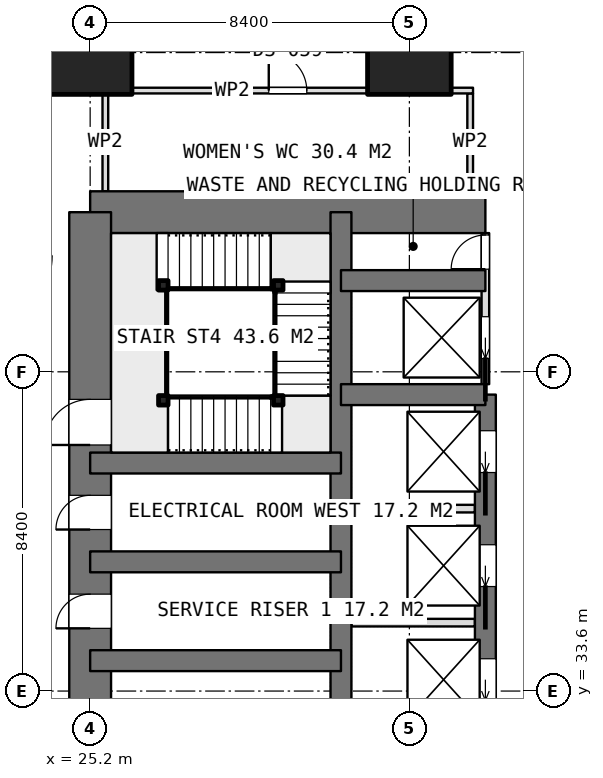
"""IFC4 building model, lengths in metres.
Left out: names, types, materials, properties, quantities, classifications, styles, units other than length and angle.
Written with IfcOpenShell. Run it as: python <this file> out.ifc"""

import sys

from ifc_helpers import new_model, si_unit, direction, frame, frame_2d, origin, origin_2d, place, context, subcontext, project, spatial, rectangle, extrude, element, fill, save


model = new_model("IFC4")
c1 = context("Model", 3, precision=1e-05, world=origin(), true_north=direction((0.0, 1.0)))
c2 = subcontext(c1, "Body", "Model", "MODEL_VIEW")
j1 = project(units=[si_unit("LENGTHUNIT", "METRE"), si_unit("PLANEANGLEUNIT", "RADIAN")], contexts=[c1])
p1 = place(None, origin())
s1 = spatial("IfcSite", under=j1, at=p1, CompositionType="ELEMENT")
p2 = place(p1, origin())
s2 = spatial("IfcBuilding", under=s1, at=p2, CompositionType="ELEMENT")
p3 = place(p2, frame((0.0, 0.0, 51.65)))
s3 = spatial("IfcBuildingStorey", under=s2, at=p3, CompositionType="ELEMENT", Elevation=51.65)
p4 = place(p3, frame((25.2, 46.2, 0.0), z_axis=(0.0, 0.0, 1.0), x_axis=(1.0, 0.0, 0.0)))
e1 = element("IfcWall", 1, at=p4, inside=s3, PredefinedType="SHEAR", context=c2, shape_type="SweptSolid", body=[
    extrude(rectangle(XDim=10.4, YDim=1.1, at=frame_2d((5.2, 0.0))), origin(), (0.0, 0.0, 1.0), 3.75),
])
p5 = place(p3, frame((25.2, 21.0, 0.0), z_axis=(0.0, 0.0, 1.0), x_axis=(0.0, 1.0, 0.0)))
e2 = element("IfcWall", 2, at=p5, inside=s3, PredefinedType="SHEAR", context=c2, shape_type="SweptSolid", body=[
    extrude(rectangle(XDim=25.2, YDim=1.1, at=frame_2d((12.6, 0.0))), origin(), (0.0, 0.0, 1.0), 3.75),
])
p6 = place(p5, frame((7.8, 0.0, 0.0)))
e3 = element("IfcOpeningElement", 3, at=p6, cuts=e2, PredefinedType="OPENING", context=c2, shape_type="SweptSolid", body=[
    extrude(rectangle(XDim=1.2, YDim=2.1, at=frame_2d((0.6, 1.05))), frame((0.0, 0.56, 0.0), z_axis=(0.0, -1.0, 0.0), x_axis=(1.0, 0.0, 0.0)), (0.0, 0.0, 1.0), 1.12),
])
p7 = place(p5, frame((14.25, 0.0, 0.0)))
e4 = element("IfcOpeningElement", 4, at=p7, cuts=e2, PredefinedType="OPENING", context=c2, shape_type="SweptSolid", body=[
    extrude(rectangle(XDim=0.9, YDim=2.1, at=frame_2d((0.45, 1.05))), frame((0.0, 0.56, 0.0), z_axis=(0.0, -1.0, 0.0), x_axis=(1.0, 0.0, 0.0)), (0.0, 0.0, 1.0), 1.12),
])
p8 = place(p5, frame((16.85, 0.0, 0.0)))
e5 = element("IfcOpeningElement", 5, at=p8, cuts=e2, PredefinedType="OPENING", context=c2, shape_type="SweptSolid", body=[
    extrude(rectangle(XDim=0.9, YDim=2.1, at=frame_2d((0.45, 1.05))), frame((0.0, 0.56, 0.0), z_axis=(0.0, -1.0, 0.0), x_axis=(1.0, 0.0, 0.0)), (0.0, 0.0, 1.0), 1.12),
])
p9 = place(p5, frame((19.075, 0.0, 0.0)))
e6 = element("IfcOpeningElement", 6, at=p9, cuts=e2, PredefinedType="OPENING", context=c2, shape_type="SweptSolid", body=[
    extrude(rectangle(XDim=1.2, YDim=2.1, at=frame_2d((0.6, 1.05))), frame((0.0, 0.56, 0.0), z_axis=(0.0, -1.0, 0.0), x_axis=(1.0, 0.0, 0.0)), (0.0, 0.0, 1.0), 1.12),
])
p10 = place(p3, frame((31.8, 21.0, 0.0), z_axis=(0.0, 0.0, 1.0), x_axis=(0.0, 1.0, 0.0)))
e7 = element("IfcWall", 7, at=p10, inside=s3, PredefinedType="SHEAR", context=c2, shape_type="SweptSolid", body=[
    extrude(rectangle(XDim=25.2, YDim=0.55, at=frame_2d((12.6, 0.0))), origin(), (0.0, 0.0, 1.0), 3.75),
])
p11 = place(p3, frame((35.6, 23.4, 0.0), z_axis=(0.0, 0.0, 1.0), x_axis=(0.0, 1.0, 0.0)))
e8 = element("IfcWall", 8, at=p11, inside=s3, PredefinedType="SHEAR", context=c2, shape_type="SweptSolid", body=[
    extrude(rectangle(XDim=18.0, YDim=0.55, at=frame_2d((9.0, 0.0))), origin(), (0.0, 0.0, 1.0), 3.75),
])
p12 = place(p11, frame((0.95, 0.0, 0.0)))
e9 = element("IfcOpeningElement", 9, at=p12, cuts=e8, PredefinedType="OPENING", context=c2, shape_type="SweptSolid", body=[
    extrude(rectangle(XDim=1.1, YDim=2.1, at=frame_2d((0.55, 1.05))), frame((0.0, 0.285, 0.0), z_axis=(0.0, -1.0, 0.0), x_axis=(1.0, 0.0, 0.0)), (0.0, 0.0, 1.0), 0.57),
])
p13 = place(p11, frame((3.95, 0.0, 0.0)))
e10 = element("IfcOpeningElement", 10, at=p13, cuts=e8, PredefinedType="OPENING", context=c2, shape_type="SweptSolid", body=[
    extrude(rectangle(XDim=1.1, YDim=2.1, at=frame_2d((0.55, 1.05))), frame((0.0, 0.285, 0.0), z_axis=(0.0, -1.0, 0.0), x_axis=(1.0, 0.0, 0.0)), (0.0, 0.0, 1.0), 0.57),
])
p14 = place(p11, frame((6.95, 0.0, 0.0)))
e11 = element("IfcOpeningElement", 11, at=p14, cuts=e8, PredefinedType="OPENING", context=c2, shape_type="SweptSolid", body=[
    extrude(rectangle(XDim=1.1, YDim=2.1, at=frame_2d((0.55, 1.05))), frame((0.0, 0.285, 0.0), z_axis=(0.0, -1.0, 0.0), x_axis=(1.0, 0.0, 0.0)), (0.0, 0.0, 1.0), 0.57),
])
p15 = place(p11, frame((9.95, 0.0, 0.0)))
e12 = element("IfcOpeningElement", 12, at=p15, cuts=e8, PredefinedType="OPENING", context=c2, shape_type="SweptSolid", body=[
    extrude(rectangle(XDim=1.1, YDim=2.1, at=frame_2d((0.55, 1.05))), frame((0.0, 0.285, 0.0), z_axis=(0.0, -1.0, 0.0), x_axis=(1.0, 0.0, 0.0)), (0.0, 0.0, 1.0), 0.57),
])
p16 = place(p11, frame((12.95, 0.0, 0.0)))
e13 = element("IfcOpeningElement", 13, at=p16, cuts=e8, PredefinedType="OPENING", context=c2, shape_type="SweptSolid", body=[
    extrude(rectangle(XDim=1.1, YDim=2.1, at=frame_2d((0.55, 1.05))), frame((0.0, 0.285, 0.0), z_axis=(0.0, -1.0, 0.0), x_axis=(1.0, 0.0, 0.0)), (0.0, 0.0, 1.0), 0.57),
])
p17 = place(p11, frame((15.95, 0.0, 0.0)))
e14 = element("IfcOpeningElement", 14, at=p17, cuts=e8, PredefinedType="OPENING", context=c2, shape_type="SweptSolid", body=[
    extrude(rectangle(XDim=1.1, YDim=2.1, at=frame_2d((0.55, 1.05))), frame((0.0, 0.285, 0.0), z_axis=(0.0, -1.0, 0.0), x_axis=(1.0, 0.0, 0.0)), (0.0, 0.0, 1.0), 0.57),
])
for number, where, z_axis, x_axis in (
    (15, (31.8, 41.4, 0.0), (0.0, 0.0, 1.0), (1.0, 0.0, 0.0)),
    (16, (31.8, 44.4, 0.0), (0.0, 0.0, 1.0), (1.0, 0.0, 0.0)),
):
    element("IfcWall", number, at=place(p3, frame(where, z_axis=z_axis, x_axis=x_axis)), inside=s3, PredefinedType="SHEAR", context=c2, shape_type="SweptSolid", body=[
        extrude(rectangle(XDim=3.8, YDim=0.55, at=frame_2d((1.9, 0.0))), origin(), (0.0, 0.0, 1.0), 3.75),
    ])
for number, where, z_axis, x_axis in (
    (17, (25.2, 34.4, 0.0), (0.0, 0.0, 1.0), (1.0, 0.0, 0.0)),
    (18, (25.2, 37.0, 0.0), (0.0, 0.0, 1.0), (1.0, 0.0, 0.0)),
    (19, (25.2, 39.6, 0.0), (0.0, 0.0, 1.0), (1.0, 0.0, 0.0)),
):
    element("IfcWall", number, at=place(p3, frame(where, z_axis=z_axis, x_axis=x_axis)), inside=s3, PredefinedType="SHEAR", context=c2, shape_type="SweptSolid", body=[
        extrude(rectangle(XDim=6.6, YDim=0.55, at=frame_2d((3.3, 0.0))), origin(), (0.0, 0.0, 1.0), 3.75),
    ])
for number, where, z_axis, x_axis in (
    (20, (25.2, 50.4, 0.0), (0.0, 0.0, 1.0), (1.0, 0.0, 0.0)),
    (21, (33.6, 50.4, 0.0), (0.0, 0.0, 1.0), (1.0, 0.0, 0.0)),
):
    element("IfcColumn", number, at=place(p3, frame(where, z_axis=z_axis, x_axis=x_axis)), inside=s3, PredefinedType="COLUMN", context=c2, shape_type="SweptSolid", body=[
        extrude(rectangle(XDim=2.2, YDim=2.2, at=origin_2d()), origin(), (0.0, 0.0, 1.0), 3.75),
    ])
for number, where, z_axis, x_axis in (
    (22, (32.075, 35.4, 0.0), (0.0, 0.0, 1.0), (1.0, 0.0, 0.0)),
    (23, (32.075, 38.4, 0.0), (0.0, 0.0, 1.0), (1.0, 0.0, 0.0)),
):
    element("IfcWall", number, at=place(p3, frame(where, z_axis=z_axis, x_axis=x_axis)), inside=s3, PredefinedType="PARTITIONING", context=c2, shape_type="SweptSolid", body=[
        extrude(rectangle(XDim=3.25, YDim=0.2, at=frame_2d((1.625, 0.0))), origin(), (0.0, 0.0, 1.0), 3.5),
    ])
p18 = place(p3, frame((35.6, 41.675, 0.0), z_axis=(0.0, 0.0, 1.0), x_axis=(0.0, 1.0, 0.0)))
e24 = element("IfcWall", 24, at=p18, inside=s3, PredefinedType="PARTITIONING", context=c2, shape_type="SweptSolid", body=[
    extrude(rectangle(XDim=3.975, YDim=0.2, at=frame_2d((1.987, 0.0))), origin(), (0.0, 0.0, 1.0), 3.5),
])
p19 = place(p18, frame((3.025, 0.0, 0.0)))
e25 = element("IfcOpeningElement", 25, at=p19, cuts=e24, PredefinedType="OPENING", context=c2, shape_type="SweptSolid", body=[
    extrude(rectangle(XDim=0.9, YDim=2.1, at=frame_2d((0.45, 1.05))), frame((0.0, 0.11, 0.0), z_axis=(0.0, -1.0, 0.0), x_axis=(1.0, 0.0, 0.0)), (0.0, 0.0, 1.0), 0.22),
])
p20 = place(p18, frame((0.675, 0.0, 0.0)))
e26 = element("IfcOpeningElement", 26, at=p20, cuts=e24, PredefinedType="OPENING", context=c2, shape_type="SweptSolid", body=[
    extrude(rectangle(XDim=1.1, YDim=2.1, at=frame_2d((0.55, 1.05))), frame((0.0, 0.11, 0.0), z_axis=(0.0, -1.0, 0.0), x_axis=(1.0, 0.0, 0.0)), (0.0, 0.0, 1.0), 0.22),
])
p21 = place(p3, frame((25.525, 49.4, 0.0), z_axis=(0.0, 0.0, 1.0), x_axis=(1.0, 0.0, 0.0)))
e27 = element("IfcWall", 27, at=p21, inside=s3, PredefinedType="PARTITIONING", context=c2, shape_type="SweptSolid", body=[
    extrude(rectangle(XDim=9.75, YDim=0.15, at=frame_2d((4.875, 0.0))), origin(), (0.0, 0.0, 1.0), 3.5),
])
p22 = place(p21, frame((4.375, 0.0, 0.0)))
e28 = element("IfcOpeningElement", 28, at=p22, cuts=e27, PredefinedType="OPENING", context=c2, shape_type="SweptSolid", body=[
    extrude(rectangle(XDim=1.0, YDim=2.1, at=frame_2d((0.5, 1.05))), frame((0.0, 0.085, 0.0), z_axis=(0.0, -1.0, 0.0), x_axis=(1.0, 0.0, 0.0)), (0.0, 0.0, 1.0), 0.17),
])
for number, where, z_axis, x_axis in (
    (29, (25.6, 46.75, 0.0), (0.0, 0.0, 1.0), (0.0, 1.0, 0.0)),
    (30, (35.2, 46.75, 0.0), (0.0, 0.0, 1.0), (0.0, 1.0, 0.0)),
):
    element("IfcWall", number, at=place(p3, frame(where, z_axis=z_axis, x_axis=x_axis)), inside=s3, PredefinedType="PARTITIONING", context=c2, shape_type="SweptSolid", body=[
        extrude(rectangle(XDim=2.575, YDim=0.15, at=frame_2d((1.288, 0.0))), origin(), (0.0, 0.0, 1.0), 3.5),
    ])
for number, where, z_axis, x_axis in (
    (31, (27.125, 41.25, 0.0), (0.0, 0.0, 1.0), (1.0, 0.0, 0.0)),
    (32, (30.15, 41.25, 0.0), (0.0, 0.0, 1.0), (1.0, 0.0, 0.0)),
    (33, (30.15, 44.275, 0.0), (0.0, 0.0, 1.0), (1.0, 0.0, 0.0)),
    (34, (27.125, 44.275, 0.0), (0.0, 0.0, 1.0), (1.0, 0.0, 0.0)),
):
    element("IfcColumn", number, at=place(p3, frame(where, z_axis=z_axis, x_axis=x_axis)), inside=s3, PredefinedType="COLUMN", context=c2, shape_type="SweptSolid", body=[
        extrude(rectangle(XDim=0.25, YDim=0.25, at=origin_2d()), origin(), (0.0, 0.0, 1.0), 3.75),
    ])
p23 = place(p7, origin())
e35 = element("IfcDoor", 35, at=p23, inside=s3, OperationType="SINGLE_SWING_LEFT", PredefinedType="DOOR", context=c2, shape_type="SweptSolid", body=[
    extrude(rectangle(XDim=0.9, YDim=2.1, at=frame_2d((0.45, 1.05))), frame((0.0, 0.025, 0.0), z_axis=(0.0, -1.0, 0.0), x_axis=(1.0, 0.0, 0.0)), (0.0, 0.0, 1.0), 0.05),
])
fill(e4, e35)
p24 = place(p8, origin())
e36 = element("IfcDoor", 36, at=p24, inside=s3, OperationType="SINGLE_SWING_LEFT", PredefinedType="DOOR", context=c2, shape_type="SweptSolid", body=[
    extrude(rectangle(XDim=0.9, YDim=2.1, at=frame_2d((0.45, 1.05))), frame((0.0, 0.025, 0.0), z_axis=(0.0, -1.0, 0.0), x_axis=(1.0, 0.0, 0.0)), (0.0, 0.0, 1.0), 0.05),
])
fill(e5, e36)
p25 = place(p19, origin())
e37 = element("IfcDoor", 37, at=p25, inside=s3, OperationType="SINGLE_SWING_LEFT", PredefinedType="DOOR", context=c2, shape_type="SweptSolid", body=[
    extrude(rectangle(XDim=0.9, YDim=2.1, at=frame_2d((0.45, 1.05))), frame((0.0, 0.025, 0.0), z_axis=(0.0, -1.0, 0.0), x_axis=(1.0, 0.0, 0.0)), (0.0, 0.0, 1.0), 0.05),
])
fill(e25, e37)
p26 = place(p15, origin())
e38 = element("IfcDoor", 38, at=p26, inside=s3, OperationType="SLIDING_TO_LEFT", PredefinedType="USERDEFINED", context=c2, shape_type="SweptSolid", body=[
    extrude(rectangle(XDim=1.1, YDim=2.1, at=frame_2d((0.55, 1.05))), frame((0.0, 0.025, 0.0), z_axis=(0.0, -1.0, 0.0), x_axis=(1.0, 0.0, 0.0)), (0.0, 0.0, 1.0), 0.05),
])
fill(e12, e38)
p27 = place(p16, origin())
e39 = element("IfcDoor", 39, at=p27, inside=s3, OperationType="SLIDING_TO_LEFT", PredefinedType="USERDEFINED", context=c2, shape_type="SweptSolid", body=[
    extrude(rectangle(XDim=1.1, YDim=2.1, at=frame_2d((0.55, 1.05))), frame((0.0, 0.025, 0.0), z_axis=(0.0, -1.0, 0.0), x_axis=(1.0, 0.0, 0.0)), (0.0, 0.0, 1.0), 0.05),
])
fill(e13, e39)
p28 = place(p17, origin())
e40 = element("IfcDoor", 40, at=p28, inside=s3, OperationType="SLIDING_TO_LEFT", PredefinedType="USERDEFINED", context=c2, shape_type="SweptSolid", body=[
    extrude(rectangle(XDim=1.1, YDim=2.1, at=frame_2d((0.55, 1.05))), frame((0.0, 0.025, 0.0), z_axis=(0.0, -1.0, 0.0), x_axis=(1.0, 0.0, 0.0)), (0.0, 0.0, 1.0), 0.05),
])
fill(e14, e40)
p29 = place(p20, origin())
e41 = element("IfcDoor", 41, at=p29, inside=s3, OperationType="SLIDING_TO_LEFT", PredefinedType="USERDEFINED", context=c2, shape_type="SweptSolid", body=[
    extrude(rectangle(XDim=1.1, YDim=2.1, at=frame_2d((0.55, 1.05))), frame((0.0, 0.025, 0.0), z_axis=(0.0, -1.0, 0.0), x_axis=(1.0, 0.0, 0.0)), (0.0, 0.0, 1.0), 0.05),
])
fill(e26, e41)
p30 = place(p22, origin())
e42 = element("IfcDoor", 42, at=p30, inside=s3, OperationType="SINGLE_SWING_LEFT", PredefinedType="DOOR", context=c2, shape_type="SweptSolid", body=[
    extrude(rectangle(XDim=1.0, YDim=2.1, at=frame_2d((0.5, 1.05))), frame((0.0, 0.025, 0.0), z_axis=(0.0, -1.0, 0.0), x_axis=(1.0, 0.0, 0.0)), (0.0, 0.0, 1.0), 0.05),
])
fill(e28, e42)
p31 = place(p9, origin())
e43 = element("IfcDoor", 43, at=p31, inside=s3, OperationType="SINGLE_SWING_RIGHT", PredefinedType="DOOR", context=c2, shape_type="SweptSolid", body=[
    extrude(rectangle(XDim=1.2, YDim=2.1, at=frame_2d((0.6, 1.05))), frame((0.0, 0.025, 0.0), z_axis=(0.0, -1.0, 0.0), x_axis=(1.0, 0.0, 0.0)), (0.0, 0.0, 1.0), 0.05),
])
fill(e6, e43)
save(model, sys.argv[1])
